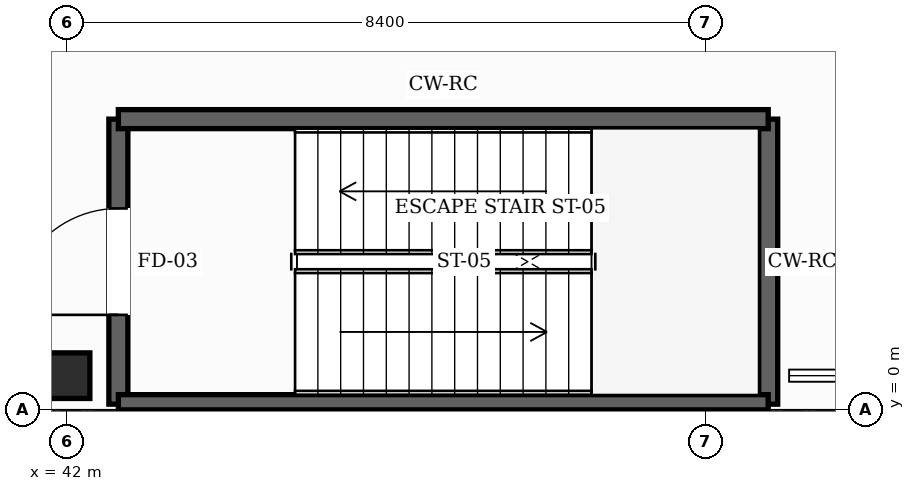
"""IFC4 building model, lengths in metres.
Left out: names, types, materials, properties, quantities, classifications, styles, units other than length and angle.
Written with IfcOpenShell. Run it as: python <this file> out.ifc"""

import sys

from ifc_helpers import new_model, si_unit, direction, frame, frame_2d, origin, origin_2d, place, context, subcontext, project, spatial, rectangle, hollow_rectangle, extrude, element, fill, save


model = new_model("IFC4")
c1 = context("Model", 3, precision=1e-05, world=origin(), true_north=direction((0.0, 1.0)))
c2 = subcontext(c1, "Body", "Model", "MODEL_VIEW")
j1 = project(units=[si_unit("LENGTHUNIT", "METRE"), si_unit("PLANEANGLEUNIT", "RADIAN")], contexts=[c1])
p1 = place(None, origin())
s1 = spatial("IfcSite", under=j1, at=p1, CompositionType="ELEMENT")
p2 = place(p1, origin())
s2 = spatial("IfcBuilding", under=s1, at=p2, CompositionType="ELEMENT")
p3 = place(p2, frame((0.0, 0.0, 5.4)))
s3 = spatial("IfcBuildingStorey", under=s2, at=p3, CompositionType="ELEMENT", Elevation=5.4)
p4 = place(p3, frame((42.0, 0.45, 0.0), z_axis=(0.0, 0.0, 1.0), x_axis=(1.0, 0.0, 0.0)))
e1 = element("IfcColumn", 1, at=p4, inside=s3, PredefinedType="COLUMN", context=c2, shape_type="SweptSolid", body=[
    extrude(hollow_rectangle(XDim=0.6, YDim=0.6, WallThickness=0.025, InnerFilletRadius=0.025, OuterFilletRadius=0.05, at=origin_2d()), origin(), (0.0, 0.0, 1.0), 4.55),
])
p5 = place(p3, frame((42.675, 0.075, 0.0), z_axis=(0.0, 0.0, 1.0), x_axis=(0.0, 1.0, 0.0)))
e2 = element("IfcWall", 2, at=p5, inside=s3, PredefinedType="SHEAR", context=c2, shape_type="SweptSolid", body=[
    extrude(rectangle(XDim=3.75, YDim=0.25, at=frame_2d((1.875, 0.0))), origin(), (0.0, 0.0, 1.0), 4.55),
])
p6 = place(p5, frame((1.175, 0.0, 0.0)))
e3 = element("IfcOpeningElement", 3, at=p6, cuts=e2, PredefinedType="OPENING", context=c2, shape_type="SweptSolid", body=[
    extrude(rectangle(XDim=1.4, YDim=2.25, at=frame_2d((0.7, 1.125))), frame((0.0, 0.135, 0.0), z_axis=(0.0, -1.0, 0.0), x_axis=(1.0, 0.0, 0.0)), (0.0, 0.0, 1.0), 0.27),
])
p7 = place(p3, frame((51.225, 3.825, 0.0), z_axis=(0.0, 0.0, 1.0), x_axis=(0.0, -1.0, 0.0)))
e4 = element("IfcWall", 4, at=p7, inside=s3, PredefinedType="SHEAR", context=c2, shape_type="SweptSolid", body=[
    extrude(rectangle(XDim=3.75, YDim=0.25, at=frame_2d((1.875, 0.0))), origin(), (0.0, 0.0, 1.0), 4.55),
])
for number, where, z_axis, x_axis in (
    (5, (51.225, 0.075, 0.0), (0.0, 0.0, 1.0), (-1.0, 0.0, 0.0)),
    (6, (42.675, 3.825, 0.0), (0.0, 0.0, 1.0), (1.0, 0.0, 0.0)),
):
    element("IfcWall", number, at=place(p3, frame(where, z_axis=z_axis, x_axis=x_axis)), inside=s3, PredefinedType="SHEAR", context=c2, shape_type="SweptSolid", body=[
        extrude(rectangle(XDim=8.55, YDim=0.25, at=frame_2d((4.275, 0.0))), origin(), (0.0, 0.0, 1.0), 4.55),
    ])
p8 = place(p6, origin())
e7 = element("IfcDoor", 7, at=p8, inside=s3, OperationType="SINGLE_SWING_LEFT", PredefinedType="DOOR", context=c2, shape_type="SweptSolid", body=[
    extrude(rectangle(XDim=1.4, YDim=2.25, at=frame_2d((0.7, 1.125))), frame((0.0, 0.025, 0.0), z_axis=(0.0, -1.0, 0.0), x_axis=(1.0, 0.0, 0.0)), (0.0, 0.0, 1.0), 0.05),
])
fill(e3, e7)
save(model, sys.argv[1])
